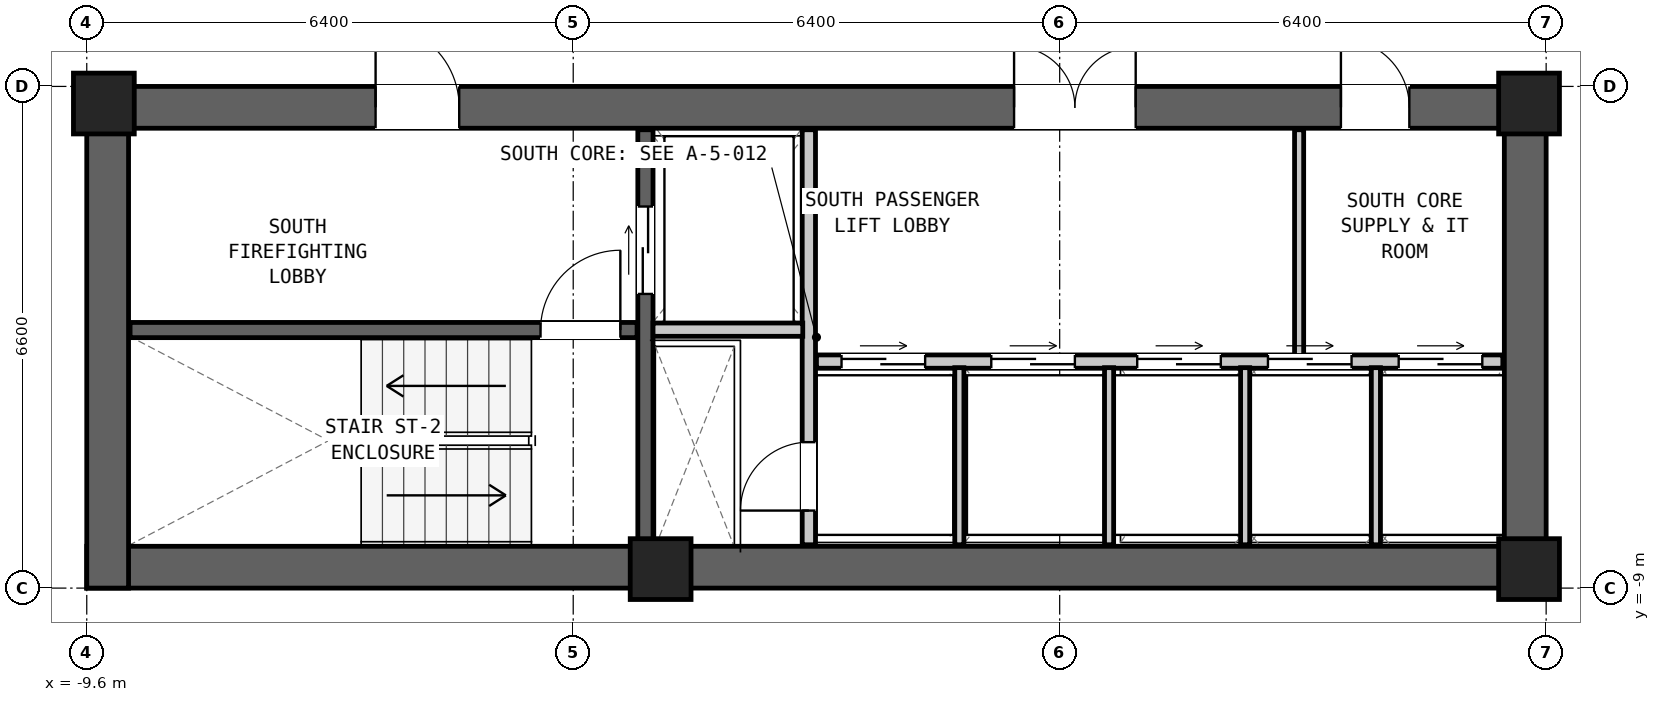
"""IFC4 building model, lengths in metres.
Left out: names, types, materials, properties, quantities, classifications, styles, units other than length and angle.
Written with IfcOpenShell. Run it as: python <this file> out.ifc"""

import sys

from ifc_helpers import new_model, si_unit, direction, frame, frame_2d, origin, origin_2d, place, context, subcontext, project, spatial, rectangle, extrude, element, fill, save


model = new_model("IFC4")
c1 = context("Model", 3, precision=1e-05, world=origin(), true_north=direction((0.0, 1.0)))
c2 = subcontext(c1, "Body", "Model", "MODEL_VIEW")
j1 = project(units=[si_unit("LENGTHUNIT", "METRE"), si_unit("PLANEANGLEUNIT", "RADIAN")], contexts=[c1])
p1 = place(None, origin())
s1 = spatial("IfcSite", under=j1, at=p1, CompositionType="ELEMENT")
p2 = place(p1, origin())
s2 = spatial("IfcBuilding", under=s1, at=p2, CompositionType="ELEMENT")
p3 = place(p2, frame((0.0, 0.0, 35.25)))
s3 = spatial("IfcBuildingStorey", under=s2, at=p3, CompositionType="ELEMENT", Elevation=35.25)
p4 = place(p3, frame((-9.6, -8.725, 0.0), z_axis=(0.0, 0.0, 1.0), x_axis=(1.0, 0.0, 0.0)))
e1 = element("IfcWall", 1, at=p4, inside=s3, PredefinedType="SHEAR", context=c2, shape_type="SweptSolid", body=[
    extrude(rectangle(XDim=19.2, YDim=0.55, at=frame_2d((9.6, 0.0))), origin(), (0.0, 0.0, 1.0), 3.05),
])
p5 = place(p3, frame((-9.6, -2.675, 0.0), z_axis=(0.0, 0.0, 1.0), x_axis=(1.0, 0.0, 0.0)))
e2 = element("IfcWall", 2, at=p5, inside=s3, PredefinedType="SHEAR", context=c2, shape_type="SweptSolid", body=[
    extrude(rectangle(XDim=19.2, YDim=0.55, at=frame_2d((9.6, 0.0))), origin(), (0.0, 0.0, 1.0), 3.05),
])
p6 = place(p5, frame((3.8, 0.0, 0.0)))
e3 = element("IfcOpeningElement", 3, at=p6, cuts=e2, PredefinedType="OPENING", context=c2, shape_type="SweptSolid", body=[
    extrude(rectangle(XDim=1.1, YDim=2.08, at=frame_2d((0.55, 1.04))), frame((0.0, 0.287, 0.0), z_axis=(0.0, -1.0, 0.0), x_axis=(1.0, 0.0, 0.0)), (0.0, 0.0, 1.0), 0.574),
])
p7 = place(p5, frame((12.2, 0.0, 0.0)))
e4 = element("IfcOpeningElement", 4, at=p7, cuts=e2, PredefinedType="OPENING", context=c2, shape_type="SweptSolid", body=[
    extrude(rectangle(XDim=1.6, YDim=2.12, at=frame_2d((0.8, 1.06))), frame((0.0, 0.287, 0.0), z_axis=(0.0, -1.0, 0.0), x_axis=(1.0, 0.0, 0.0)), (0.0, 0.0, 1.0), 0.574),
])
p8 = place(p5, frame((16.5, 0.0, 0.0)))
e5 = element("IfcOpeningElement", 5, at=p8, cuts=e2, PredefinedType="OPENING", context=c2, shape_type="SweptSolid", body=[
    extrude(rectangle(XDim=0.9, YDim=2.05, at=frame_2d((0.45, 1.025))), frame((0.0, 0.287, 0.0), z_axis=(0.0, -1.0, 0.0), x_axis=(1.0, 0.0, 0.0)), (0.0, 0.0, 1.0), 0.574),
])
for number, where, z_axis, x_axis in (
    (6, (-9.325, -9.0, 0.0), (0.0, 0.0, 1.0), (0.0, 1.0, 0.0)),
    (7, (9.325, -9.0, 0.0), (0.0, 0.0, 1.0), (0.0, 1.0, 0.0)),
):
    element("IfcWall", number, at=place(p3, frame(where, z_axis=z_axis, x_axis=x_axis)), inside=s3, PredefinedType="SHEAR", context=c2, shape_type="SweptSolid", body=[
        extrude(rectangle(XDim=6.6, YDim=0.55, at=frame_2d((3.3, 0.0))), origin(), (0.0, 0.0, 1.0), 3.05),
    ])
for number, where, z_axis, x_axis in (
    (8, (-9.375, -2.625, 0.0), (0.0, 0.0, 1.0), (1.0, 0.0, 0.0)),
    (9, (9.375, -2.625, 0.0), (0.0, 0.0, 1.0), (1.0, 0.0, 0.0)),
    (10, (-2.05, -8.75, 0.0), (0.0, 0.0, 1.0), (1.0, 0.0, 0.0)),
    (11, (9.375, -8.75, 0.0), (0.0, 0.0, 1.0), (1.0, 0.0, 0.0)),
):
    element("IfcColumn", number, at=place(p3, frame(where, z_axis=z_axis, x_axis=x_axis)), inside=s3, PredefinedType="COLUMN", context=c2, shape_type="SweptSolid", body=[
        extrude(rectangle(XDim=0.8, YDim=0.8, at=origin_2d()), origin(), (0.0, 0.0, 1.0), 3.05),
    ])
p9 = place(p3, frame((-9.03, -5.605, 0.0), z_axis=(0.0, 0.0, 1.0), x_axis=(1.0, 0.0, 0.0)))
e12 = element("IfcWall", 12, at=p9, inside=s3, PredefinedType="SHEAR", context=c2, shape_type="SweptSolid", body=[
    extrude(rectangle(XDim=6.67, YDim=0.2, at=frame_2d((3.335, 0.0))), origin(), (0.0, 0.0, 1.0), 2.83),
])
p10 = place(p9, frame((5.4, 0.0, 0.0)))
e13 = element("IfcOpeningElement", 13, at=p10, cuts=e12, PredefinedType="OPENING", context=c2, shape_type="SweptSolid", body=[
    extrude(rectangle(XDim=1.05, YDim=2.08, at=frame_2d((0.525, 1.04))), frame((0.0, 0.112, 0.0), z_axis=(0.0, -1.0, 0.0), x_axis=(1.0, 0.0, 0.0)), (0.0, 0.0, 1.0), 0.224),
])
p11 = place(p3, frame((-2.25, -8.43, 0.0), z_axis=(0.0, 0.0, 1.0), x_axis=(0.0, 1.0, 0.0)))
e14 = element("IfcWall", 14, at=p11, inside=s3, PredefinedType="SHEAR", context=c2, shape_type="SweptSolid", body=[
    extrude(rectangle(XDim=5.46, YDim=0.2, at=frame_2d((2.73, 0.0))), origin(), (0.0, 0.0, 1.0), 2.83),
])
p12 = place(p11, frame((3.3, 0.0, 0.0)))
e15 = element("IfcOpeningElement", 15, at=p12, cuts=e14, PredefinedType="OPENING", context=c2, shape_type="SweptSolid", body=[
    extrude(rectangle(XDim=1.15, YDim=2.08, at=frame_2d((0.575, 1.04))), frame((0.0, 0.112, 0.0), z_axis=(0.0, -1.0, 0.0), x_axis=(1.0, 0.0, 0.0)), (0.0, 0.0, 1.0), 0.224),
])
p13 = place(p3, frame((-0.1, -8.43, 0.0), z_axis=(0.0, 0.0, 1.0), x_axis=(0.0, 1.0, 0.0)))
e16 = element("IfcWall", 16, at=p13, inside=s3, PredefinedType="PARTITIONING", context=c2, shape_type="SweptSolid", body=[
    extrude(rectangle(XDim=5.46, YDim=0.175, at=frame_2d((2.73, 0.0))), origin(), (0.0, 0.0, 1.0), 2.83),
])
p14 = place(p13, frame((0.45, 0.0, 0.0)))
e17 = element("IfcOpeningElement", 17, at=p14, cuts=e16, PredefinedType="OPENING", context=c2, shape_type="SweptSolid", body=[
    extrude(rectangle(XDim=0.9, YDim=2.05, at=frame_2d((0.45, 1.025))), frame((0.0, 0.1, 0.0), z_axis=(0.0, -1.0, 0.0), x_axis=(1.0, 0.0, 0.0)), (0.0, 0.0, 1.0), 0.199),
])
p15 = place(p3, frame((-2.15, -5.6, 0.0), z_axis=(0.0, 0.0, 1.0), x_axis=(1.0, 0.0, 0.0)))
e18 = element("IfcWall", 18, at=p15, inside=s3, PredefinedType="PARTITIONING", context=c2, shape_type="SweptSolid", body=[
    extrude(rectangle(XDim=1.97, YDim=0.175, at=frame_2d((0.985, 0.0))), origin(), (0.0, 0.0, 1.0), 2.83),
])
p16 = place(p3, frame((0.0, -6.02, 0.0), z_axis=(0.0, 0.0, 1.0), x_axis=(1.0, 0.0, 0.0)))
e19 = element("IfcWall", 19, at=p16, inside=s3, PredefinedType="PARTITIONING", context=c2, shape_type="SweptSolid", body=[
    extrude(rectangle(XDim=9.03, YDim=0.175, at=frame_2d((4.515, 0.0))), origin(), (0.0, 0.0, 1.0), 2.83),
])
p17 = place(p16, frame((0.33, 0.0, 0.0)))
e20 = element("IfcOpeningElement", 20, at=p17, cuts=e19, PredefinedType="OPENING", context=c2, shape_type="SweptSolid", body=[
    extrude(rectangle(XDim=1.1, YDim=2.06, at=frame_2d((0.55, 1.03))), frame((0.0, 0.1, 0.0), z_axis=(0.0, -1.0, 0.0), x_axis=(1.0, 0.0, 0.0)), (0.0, 0.0, 1.0), 0.199),
])
p18 = place(p16, frame((2.3, 0.0, 0.0)))
e21 = element("IfcOpeningElement", 21, at=p18, cuts=e19, PredefinedType="OPENING", context=c2, shape_type="SweptSolid", body=[
    extrude(rectangle(XDim=1.1, YDim=2.06, at=frame_2d((0.55, 1.03))), frame((0.0, 0.1, 0.0), z_axis=(0.0, -1.0, 0.0), x_axis=(1.0, 0.0, 0.0)), (0.0, 0.0, 1.0), 0.199),
])
p19 = place(p16, frame((4.22, 0.0, 0.0)))
e22 = element("IfcOpeningElement", 22, at=p19, cuts=e19, PredefinedType="OPENING", context=c2, shape_type="SweptSolid", body=[
    extrude(rectangle(XDim=1.1, YDim=2.06, at=frame_2d((0.55, 1.03))), frame((0.0, 0.1, 0.0), z_axis=(0.0, -1.0, 0.0), x_axis=(1.0, 0.0, 0.0)), (0.0, 0.0, 1.0), 0.199),
])
p20 = place(p16, frame((5.94, 0.0, 0.0)))
e23 = element("IfcOpeningElement", 23, at=p20, cuts=e19, PredefinedType="OPENING", context=c2, shape_type="SweptSolid", body=[
    extrude(rectangle(XDim=1.1, YDim=2.06, at=frame_2d((0.55, 1.03))), frame((0.0, 0.1, 0.0), z_axis=(0.0, -1.0, 0.0), x_axis=(1.0, 0.0, 0.0)), (0.0, 0.0, 1.0), 0.199),
])
p21 = place(p16, frame((7.66, 0.0, 0.0)))
e24 = element("IfcOpeningElement", 24, at=p21, cuts=e19, PredefinedType="OPENING", context=c2, shape_type="SweptSolid", body=[
    extrude(rectangle(XDim=1.1, YDim=2.06, at=frame_2d((0.55, 1.03))), frame((0.0, 0.1, 0.0), z_axis=(0.0, -1.0, 0.0), x_axis=(1.0, 0.0, 0.0)), (0.0, 0.0, 1.0), 0.199),
])
for number, where, z_axis, x_axis in (
    (25, (1.88, -8.43, 0.0), (0.0, 0.0, 1.0), (0.0, 1.0, 0.0)),
    (26, (3.85, -8.43, 0.0), (0.0, 0.0, 1.0), (0.0, 1.0, 0.0)),
    (27, (5.64, -8.43, 0.0), (0.0, 0.0, 1.0), (0.0, 1.0, 0.0)),
    (28, (7.36, -8.43, 0.0), (0.0, 0.0, 1.0), (0.0, 1.0, 0.0)),
):
    element("IfcWall", number, at=place(p3, frame(where, z_axis=z_axis, x_axis=x_axis)), inside=s3, PredefinedType="PARTITIONING", context=c2, shape_type="SweptSolid", body=[
        extrude(rectangle(XDim=2.33, YDim=0.12, at=frame_2d((1.165, 0.0))), origin(), (0.0, 0.0, 1.0), 2.83),
    ])
p22 = place(p3, frame((6.35, -5.94, 0.0), z_axis=(0.0, 0.0, 1.0), x_axis=(0.0, 1.0, 0.0)))
e29 = element("IfcWall", 29, at=p22, inside=s3, PredefinedType="PARTITIONING", context=c2, shape_type="SweptSolid", body=[
    extrude(rectangle(XDim=2.97, YDim=0.12, at=frame_2d((1.485, 0.0))), origin(), (0.0, 0.0, 1.0), 2.83),
])
p23 = place(p10, origin())
e30 = element("IfcDoor", 30, at=p23, inside=s3, OperationType="SINGLE_SWING_RIGHT", PredefinedType="DOOR", context=c2, shape_type="SweptSolid", body=[
    extrude(rectangle(XDim=1.05, YDim=2.08, at=frame_2d((0.525, 1.04))), frame((0.0, 0.025, 0.0), z_axis=(0.0, -1.0, 0.0), x_axis=(1.0, 0.0, 0.0)), (0.0, 0.0, 1.0), 0.05),
])
fill(e13, e30)
p24 = place(p6, origin())
e31 = element("IfcDoor", 31, at=p24, inside=s3, OperationType="SINGLE_SWING_LEFT", PredefinedType="DOOR", context=c2, shape_type="SweptSolid", body=[
    extrude(rectangle(XDim=1.1, YDim=2.08, at=frame_2d((0.55, 1.04))), frame((0.0, 0.025, 0.0), z_axis=(0.0, -1.0, 0.0), x_axis=(1.0, 0.0, 0.0)), (0.0, 0.0, 1.0), 0.05),
])
fill(e3, e31)
p25 = place(p12, origin())
e32 = element("IfcDoor", 32, at=p25, inside=s3, OperationType="DOUBLE_DOOR_SLIDING", PredefinedType="DOOR", context=c2, shape_type="SweptSolid", body=[
    extrude(rectangle(XDim=1.15, YDim=2.08, at=frame_2d((0.575, 1.04))), frame((0.0, 0.025, 0.0), z_axis=(0.0, -1.0, 0.0), x_axis=(1.0, 0.0, 0.0)), (0.0, 0.0, 1.0), 0.05),
])
fill(e15, e32)
p26 = place(p14, origin())
e33 = element("IfcDoor", 33, at=p26, inside=s3, OperationType="SINGLE_SWING_LEFT", PredefinedType="DOOR", context=c2, shape_type="SweptSolid", body=[
    extrude(rectangle(XDim=0.9, YDim=2.05, at=frame_2d((0.45, 1.025))), frame((0.0, 0.025, 0.0), z_axis=(0.0, -1.0, 0.0), x_axis=(1.0, 0.0, 0.0)), (0.0, 0.0, 1.0), 0.05),
])
fill(e17, e33)
p27 = place(p7, origin())
e34 = element("IfcDoor", 34, at=p27, inside=s3, OperationType="DOUBLE_DOOR_SINGLE_SWING", PredefinedType="DOOR", context=c2, shape_type="SweptSolid", body=[
    extrude(rectangle(XDim=1.6, YDim=2.12, at=frame_2d((0.8, 1.06))), frame((0.0, 0.025, 0.0), z_axis=(0.0, -1.0, 0.0), x_axis=(1.0, 0.0, 0.0)), (0.0, 0.0, 1.0), 0.05),
])
fill(e4, e34)
p28 = place(p8, origin())
e35 = element("IfcDoor", 35, at=p28, inside=s3, OperationType="SINGLE_SWING_LEFT", PredefinedType="DOOR", context=c2, shape_type="SweptSolid", body=[
    extrude(rectangle(XDim=0.9, YDim=2.05, at=frame_2d((0.45, 1.025))), frame((0.0, 0.025, 0.0), z_axis=(0.0, -1.0, 0.0), x_axis=(1.0, 0.0, 0.0)), (0.0, 0.0, 1.0), 0.05),
])
fill(e5, e35)
p29 = place(p17, origin())
e36 = element("IfcDoor", 36, at=p29, inside=s3, OperationType="DOUBLE_DOOR_SLIDING", PredefinedType="DOOR", context=c2, shape_type="SweptSolid", body=[
    extrude(rectangle(XDim=1.1, YDim=2.06, at=frame_2d((0.55, 1.03))), frame((0.0, 0.025, 0.0), z_axis=(0.0, -1.0, 0.0), x_axis=(1.0, 0.0, 0.0)), (0.0, 0.0, 1.0), 0.05),
])
fill(e20, e36)
p30 = place(p18, origin())
e37 = element("IfcDoor", 37, at=p30, inside=s3, OperationType="DOUBLE_DOOR_SLIDING", PredefinedType="DOOR", context=c2, shape_type="SweptSolid", body=[
    extrude(rectangle(XDim=1.1, YDim=2.06, at=frame_2d((0.55, 1.03))), frame((0.0, 0.025, 0.0), z_axis=(0.0, -1.0, 0.0), x_axis=(1.0, 0.0, 0.0)), (0.0, 0.0, 1.0), 0.05),
])
fill(e21, e37)
p31 = place(p19, origin())
e38 = element("IfcDoor", 38, at=p31, inside=s3, OperationType="DOUBLE_DOOR_SLIDING", PredefinedType="DOOR", context=c2, shape_type="SweptSolid", body=[
    extrude(rectangle(XDim=1.1, YDim=2.06, at=frame_2d((0.55, 1.03))), frame((0.0, 0.025, 0.0), z_axis=(0.0, -1.0, 0.0), x_axis=(1.0, 0.0, 0.0)), (0.0, 0.0, 1.0), 0.05),
])
fill(e22, e38)
p32 = place(p20, origin())
e39 = element("IfcDoor", 39, at=p32, inside=s3, OperationType="DOUBLE_DOOR_SLIDING", PredefinedType="DOOR", context=c2, shape_type="SweptSolid", body=[
    extrude(rectangle(XDim=1.1, YDim=2.06, at=frame_2d((0.55, 1.03))), frame((0.0, 0.025, 0.0), z_axis=(0.0, -1.0, 0.0), x_axis=(1.0, 0.0, 0.0)), (0.0, 0.0, 1.0), 0.05),
])
fill(e23, e39)
p33 = place(p21, origin())
e40 = element("IfcDoor", 40, at=p33, inside=s3, OperationType="DOUBLE_DOOR_SLIDING", PredefinedType="DOOR", context=c2, shape_type="SweptSolid", body=[
    extrude(rectangle(XDim=1.1, YDim=2.06, at=frame_2d((0.55, 1.03))), frame((0.0, 0.025, 0.0), z_axis=(0.0, -1.0, 0.0), x_axis=(1.0, 0.0, 0.0)), (0.0, 0.0, 1.0), 0.05),
])
fill(e24, e40)
save(model, sys.argv[1])
